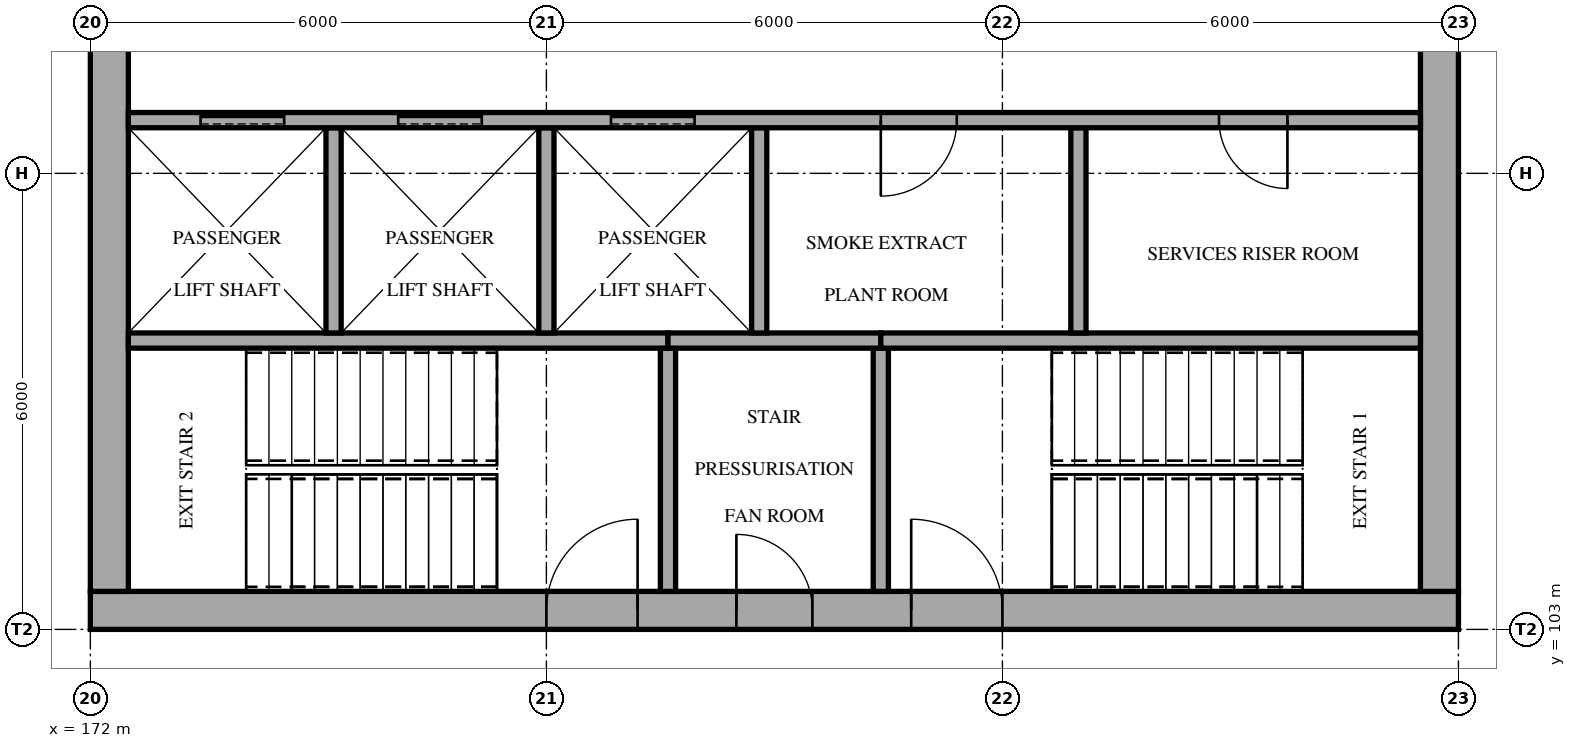
"""IFC4 building model, lengths in metres.
Left out: names, types, materials, properties, quantities, classifications, styles, units other than length and angle.
Written with IfcOpenShell. Run it as: python <this file> out.ifc"""

import sys

from ifc_helpers import new_model, si_unit, direction, frame, frame_2d, origin, place, context, subcontext, project, spatial, rectangle, extrude, element, fill, save


model = new_model("IFC4")
c1 = context("Model", 3, precision=1e-05, world=origin(), true_north=direction((0.0, 1.0)))
c2 = subcontext(c1, "Body", "Model", "MODEL_VIEW")
j1 = project(units=[si_unit("LENGTHUNIT", "METRE"), si_unit("PLANEANGLEUNIT", "RADIAN")], contexts=[c1])
p1 = place(None, origin())
s1 = spatial("IfcSite", under=j1, at=p1, CompositionType="ELEMENT")
p2 = place(p1, origin())
s2 = spatial("IfcBuilding", under=s1, at=p2, CompositionType="ELEMENT")
p3 = place(p2, frame((0.0, 0.0, 10.0)))
s3 = spatial("IfcBuildingStorey", under=s2, at=p3, CompositionType="ELEMENT", Elevation=10.0)
p4 = place(p3, frame((172.0, 103.25, 0.0), z_axis=(0.0, 0.0, 1.0), x_axis=(1.0, 0.0, 0.0)))
e1 = element("IfcWall", 1, at=p4, inside=s3, PredefinedType="SHEAR", context=c2, shape_type="SweptSolid", body=[
    extrude(rectangle(XDim=18.0, YDim=0.5, at=frame_2d((9.0, 0.0))), origin(), (0.0, 0.0, 1.0), 5.0),
])
p5 = place(p4, frame((8.5, 0.0, 0.0)))
e2 = element("IfcOpeningElement", 2, at=p5, cuts=e1, PredefinedType="OPENING", context=c2, shape_type="SweptSolid", body=[
    extrude(rectangle(XDim=1.0, YDim=2.1, at=frame_2d((0.5, 1.05))), frame((0.0, 0.26, 0.0), z_axis=(0.0, -1.0, 0.0), x_axis=(1.0, 0.0, 0.0)), (0.0, 0.0, 1.0), 0.52),
])
p6 = place(p4, frame((6.0, 0.0, 0.0)))
e3 = element("IfcOpeningElement", 3, at=p6, cuts=e1, PredefinedType="OPENING", context=c2, shape_type="SweptSolid", body=[
    extrude(rectangle(XDim=1.2, YDim=2.1, at=frame_2d((0.6, 1.05))), frame((0.0, 0.26, 0.0), z_axis=(0.0, -1.0, 0.0), x_axis=(1.0, 0.0, 0.0)), (0.0, 0.0, 1.0), 0.52),
])
p7 = place(p4, frame((10.8, 0.0, 0.0)))
e4 = element("IfcOpeningElement", 4, at=p7, cuts=e1, PredefinedType="OPENING", context=c2, shape_type="SweptSolid", body=[
    extrude(rectangle(XDim=1.2, YDim=2.1, at=frame_2d((0.6, 1.05))), frame((0.0, 0.26, 0.0), z_axis=(0.0, -1.0, 0.0), x_axis=(1.0, 0.0, 0.0)), (0.0, 0.0, 1.0), 0.52),
])
p8 = place(p3, frame((172.25, 103.5, 0.0), z_axis=(0.0, 0.0, 1.0), x_axis=(0.0, 1.0, 0.0)))
e5 = element("IfcWall", 5, at=p8, inside=s3, PredefinedType="SHEAR", context=c2, shape_type="SweptSolid", body=[
    extrude(rectangle(XDim=17.0, YDim=0.5, at=frame_2d((8.5, 0.0))), origin(), (0.0, 0.0, 1.0), 5.0),
])
p9 = place(p8, frame((7.2, 0.0, 0.0)))
e6 = element("IfcOpeningElement", 6, at=p9, cuts=e5, PredefinedType="OPENING", context=c2, shape_type="SweptSolid", body=[
    extrude(rectangle(XDim=1.4, YDim=2.1, at=frame_2d((0.7, 1.05))), frame((0.0, 0.26, 0.0), z_axis=(0.0, -1.0, 0.0), x_axis=(1.0, 0.0, 0.0)), (0.0, 0.0, 1.0), 0.52),
])
p10 = place(p3, frame((189.75, 103.5, 0.0), z_axis=(0.0, 0.0, 1.0), x_axis=(0.0, 1.0, 0.0)))
e7 = element("IfcWall", 7, at=p10, inside=s3, PredefinedType="SHEAR", context=c2, shape_type="SweptSolid", body=[
    extrude(rectangle(XDim=17.0, YDim=0.5, at=frame_2d((8.5, 0.0))), origin(), (0.0, 0.0, 1.0), 5.0),
])
p11 = place(p10, frame((7.2, 0.0, 0.0)))
e8 = element("IfcOpeningElement", 8, at=p11, cuts=e7, PredefinedType="OPENING", context=c2, shape_type="SweptSolid", body=[
    extrude(rectangle(XDim=1.4, YDim=2.1, at=frame_2d((0.7, 1.05))), frame((0.0, 0.26, 0.0), z_axis=(0.0, -1.0, 0.0), x_axis=(1.0, 0.0, 0.0)), (0.0, 0.0, 1.0), 0.52),
])
for number, where, z_axis, x_axis in (
    (9, (179.6, 103.5, 0.0), (0.0, 0.0, 1.0), (0.0, 1.0, 0.0)),
    (10, (182.4, 103.5, 0.0), (0.0, 0.0, 1.0), (0.0, 1.0, 0.0)),
):
    element("IfcWall", number, at=place(p3, frame(where, z_axis=z_axis, x_axis=x_axis)), inside=s3, PredefinedType="SOLIDWALL", context=c2, shape_type="SweptSolid", body=[
        extrude(rectangle(XDim=3.2, YDim=0.2, at=frame_2d((1.6, 0.0))), origin(), (0.0, 0.0, 1.0), 4.8),
    ])
p12 = place(p3, frame((172.5, 106.8, 0.0), z_axis=(0.0, 0.0, 1.0), x_axis=(1.0, 0.0, 0.0)))
e11 = element("IfcWall", 11, at=p12, inside=s3, PredefinedType="SOLIDWALL", context=c2, shape_type="SweptSolid", body=[
    extrude(rectangle(XDim=7.1, YDim=0.2, at=frame_2d((3.55, 0.0))), origin(), (0.0, 0.0, 1.0), 4.8),
])
p13 = place(p3, frame((179.6, 106.8, 0.0), z_axis=(0.0, 0.0, 1.0), x_axis=(1.0, 0.0, 0.0)))
e12 = element("IfcWall", 12, at=p13, inside=s3, PredefinedType="SOLIDWALL", context=c2, shape_type="SweptSolid", body=[
    extrude(rectangle(XDim=2.8, YDim=0.2, at=frame_2d((1.4, 0.0))), origin(), (0.0, 0.0, 1.0), 4.8),
])
p14 = place(p3, frame((182.4, 106.8, 0.0), z_axis=(0.0, 0.0, 1.0), x_axis=(1.0, 0.0, 0.0)))
e13 = element("IfcWall", 13, at=p14, inside=s3, PredefinedType="SOLIDWALL", context=c2, shape_type="SweptSolid", body=[
    extrude(rectangle(XDim=7.1, YDim=0.2, at=frame_2d((3.55, 0.0))), origin(), (0.0, 0.0, 1.0), 4.8),
])
for number, where, z_axis, x_axis in (
    (14, (175.2, 106.9, 0.0), (0.0, 0.0, 1.0), (0.0, 1.0, 0.0)),
    (15, (178.0, 106.9, 0.0), (0.0, 0.0, 1.0), (0.0, 1.0, 0.0)),
    (16, (180.8, 106.9, 0.0), (0.0, 0.0, 1.0), (0.0, 1.0, 0.0)),
    (17, (185.0, 106.9, 0.0), (0.0, 0.0, 1.0), (0.0, 1.0, 0.0)),
):
    element("IfcWall", number, at=place(p3, frame(where, z_axis=z_axis, x_axis=x_axis)), inside=s3, PredefinedType="SOLIDWALL", context=c2, shape_type="SweptSolid", body=[
        extrude(rectangle(XDim=2.7, YDim=0.2, at=frame_2d((1.35, 0.0))), origin(), (0.0, 0.0, 1.0), 4.8),
    ])
p15 = place(p3, frame((172.5, 109.7, 0.0), z_axis=(0.0, 0.0, 1.0), x_axis=(1.0, 0.0, 0.0)))
e18 = element("IfcWall", 18, at=p15, inside=s3, PredefinedType="SOLIDWALL", context=c2, shape_type="SweptSolid", body=[
    extrude(rectangle(XDim=17.0, YDim=0.2, at=frame_2d((8.5, 0.0))), origin(), (0.0, 0.0, 1.0), 4.8),
])
p16 = place(p15, frame((0.95, 0.0, 0.0)))
e19 = element("IfcOpeningElement", 19, at=p16, cuts=e18, PredefinedType="OPENING", context=c2, shape_type="SweptSolid", body=[
    extrude(rectangle(XDim=1.1, YDim=2.1, at=frame_2d((0.55, 1.05))), frame((0.0, 0.11, 0.0), z_axis=(0.0, -1.0, 0.0), x_axis=(1.0, 0.0, 0.0)), (0.0, 0.0, 1.0), 0.22),
])
p17 = place(p15, frame((3.55, 0.0, 0.0)))
e20 = element("IfcOpeningElement", 20, at=p17, cuts=e18, PredefinedType="OPENING", context=c2, shape_type="SweptSolid", body=[
    extrude(rectangle(XDim=1.1, YDim=2.1, at=frame_2d((0.55, 1.05))), frame((0.0, 0.11, 0.0), z_axis=(0.0, -1.0, 0.0), x_axis=(1.0, 0.0, 0.0)), (0.0, 0.0, 1.0), 0.22),
])
p18 = place(p15, frame((6.35, 0.0, 0.0)))
e21 = element("IfcOpeningElement", 21, at=p18, cuts=e18, PredefinedType="OPENING", context=c2, shape_type="SweptSolid", body=[
    extrude(rectangle(XDim=1.1, YDim=2.1, at=frame_2d((0.55, 1.05))), frame((0.0, 0.11, 0.0), z_axis=(0.0, -1.0, 0.0), x_axis=(1.0, 0.0, 0.0)), (0.0, 0.0, 1.0), 0.22),
])
p19 = place(p15, frame((9.9, 0.0, 0.0)))
e22 = element("IfcOpeningElement", 22, at=p19, cuts=e18, PredefinedType="OPENING", context=c2, shape_type="SweptSolid", body=[
    extrude(rectangle(XDim=1.0, YDim=2.1, at=frame_2d((0.5, 1.05))), frame((0.0, 0.11, 0.0), z_axis=(0.0, -1.0, 0.0), x_axis=(1.0, 0.0, 0.0)), (0.0, 0.0, 1.0), 0.22),
])
p20 = place(p15, frame((14.35, 0.0, 0.0)))
e23 = element("IfcOpeningElement", 23, at=p20, cuts=e18, PredefinedType="OPENING", context=c2, shape_type="SweptSolid", body=[
    extrude(rectangle(XDim=0.9, YDim=2.1, at=frame_2d((0.45, 1.05))), frame((0.0, 0.11, 0.0), z_axis=(0.0, -1.0, 0.0), x_axis=(1.0, 0.0, 0.0)), (0.0, 0.0, 1.0), 0.22),
])
p21 = place(p5, origin())
e24 = element("IfcDoor", 24, at=p21, inside=s3, OperationType="SINGLE_SWING_LEFT", PredefinedType="DOOR", context=c2, shape_type="SweptSolid", body=[
    extrude(rectangle(XDim=1.0, YDim=2.1, at=frame_2d((0.5, 1.05))), frame((0.0, 0.025, 0.0), z_axis=(0.0, -1.0, 0.0), x_axis=(1.0, 0.0, 0.0)), (0.0, 0.0, 1.0), 0.05),
])
fill(e2, e24)
p22 = place(p16, origin())
e25 = element("IfcDoor", 25, at=p22, inside=s3, OperationType="SLIDING_TO_LEFT", PredefinedType="DOOR", context=c2, shape_type="SweptSolid", body=[
    extrude(rectangle(XDim=1.1, YDim=2.1, at=frame_2d((0.55, 1.05))), frame((0.0, 0.025, 0.0), z_axis=(0.0, -1.0, 0.0), x_axis=(1.0, 0.0, 0.0)), (0.0, 0.0, 1.0), 0.05),
])
fill(e19, e25)
p23 = place(p17, origin())
e26 = element("IfcDoor", 26, at=p23, inside=s3, OperationType="SLIDING_TO_LEFT", PredefinedType="DOOR", context=c2, shape_type="SweptSolid", body=[
    extrude(rectangle(XDim=1.1, YDim=2.1, at=frame_2d((0.55, 1.05))), frame((0.0, 0.025, 0.0), z_axis=(0.0, -1.0, 0.0), x_axis=(1.0, 0.0, 0.0)), (0.0, 0.0, 1.0), 0.05),
])
fill(e20, e26)
p24 = place(p18, origin())
e27 = element("IfcDoor", 27, at=p24, inside=s3, OperationType="SLIDING_TO_LEFT", PredefinedType="DOOR", context=c2, shape_type="SweptSolid", body=[
    extrude(rectangle(XDim=1.1, YDim=2.1, at=frame_2d((0.55, 1.05))), frame((0.0, 0.025, 0.0), z_axis=(0.0, -1.0, 0.0), x_axis=(1.0, 0.0, 0.0)), (0.0, 0.0, 1.0), 0.05),
])
fill(e21, e27)
p25 = place(p19, frame((1.0, 0.0, 0.0), z_axis=(0.0, 0.0, 1.0), x_axis=(-1.0, 0.0, 0.0)))
e28 = element("IfcDoor", 28, at=p25, inside=s3, OperationType="SINGLE_SWING_RIGHT", PredefinedType="DOOR", context=c2, shape_type="SweptSolid", body=[
    extrude(rectangle(XDim=1.0, YDim=2.1, at=frame_2d((0.5, 1.05))), frame((0.0, 0.025, 0.0), z_axis=(0.0, -1.0, 0.0), x_axis=(1.0, 0.0, 0.0)), (0.0, 0.0, 1.0), 0.05),
])
fill(e22, e28)
p26 = place(p20, frame((0.9, 0.0, 0.0), z_axis=(0.0, 0.0, 1.0), x_axis=(-1.0, 0.0, 0.0)))
e29 = element("IfcDoor", 29, at=p26, inside=s3, OperationType="SINGLE_SWING_LEFT", PredefinedType="DOOR", context=c2, shape_type="SweptSolid", body=[
    extrude(rectangle(XDim=0.9, YDim=2.1, at=frame_2d((0.45, 1.05))), frame((0.0, 0.025, 0.0), z_axis=(0.0, -1.0, 0.0), x_axis=(1.0, 0.0, 0.0)), (0.0, 0.0, 1.0), 0.05),
])
fill(e23, e29)
p27 = place(p6, origin())
e30 = element("IfcDoor", 30, at=p27, inside=s3, OperationType="SINGLE_SWING_RIGHT", PredefinedType="DOOR", context=c2, shape_type="SweptSolid", body=[
    extrude(rectangle(XDim=1.2, YDim=2.1, at=frame_2d((0.6, 1.05))), frame((0.0, 0.025, 0.0), z_axis=(0.0, -1.0, 0.0), x_axis=(1.0, 0.0, 0.0)), (0.0, 0.0, 1.0), 0.05),
])
fill(e3, e30)
p28 = place(p7, origin())
e31 = element("IfcDoor", 31, at=p28, inside=s3, OperationType="SINGLE_SWING_LEFT", PredefinedType="DOOR", context=c2, shape_type="SweptSolid", body=[
    extrude(rectangle(XDim=1.2, YDim=2.1, at=frame_2d((0.6, 1.05))), frame((0.0, 0.025, 0.0), z_axis=(0.0, -1.0, 0.0), x_axis=(1.0, 0.0, 0.0)), (0.0, 0.0, 1.0), 0.05),
])
fill(e4, e31)
save(model, sys.argv[1])
